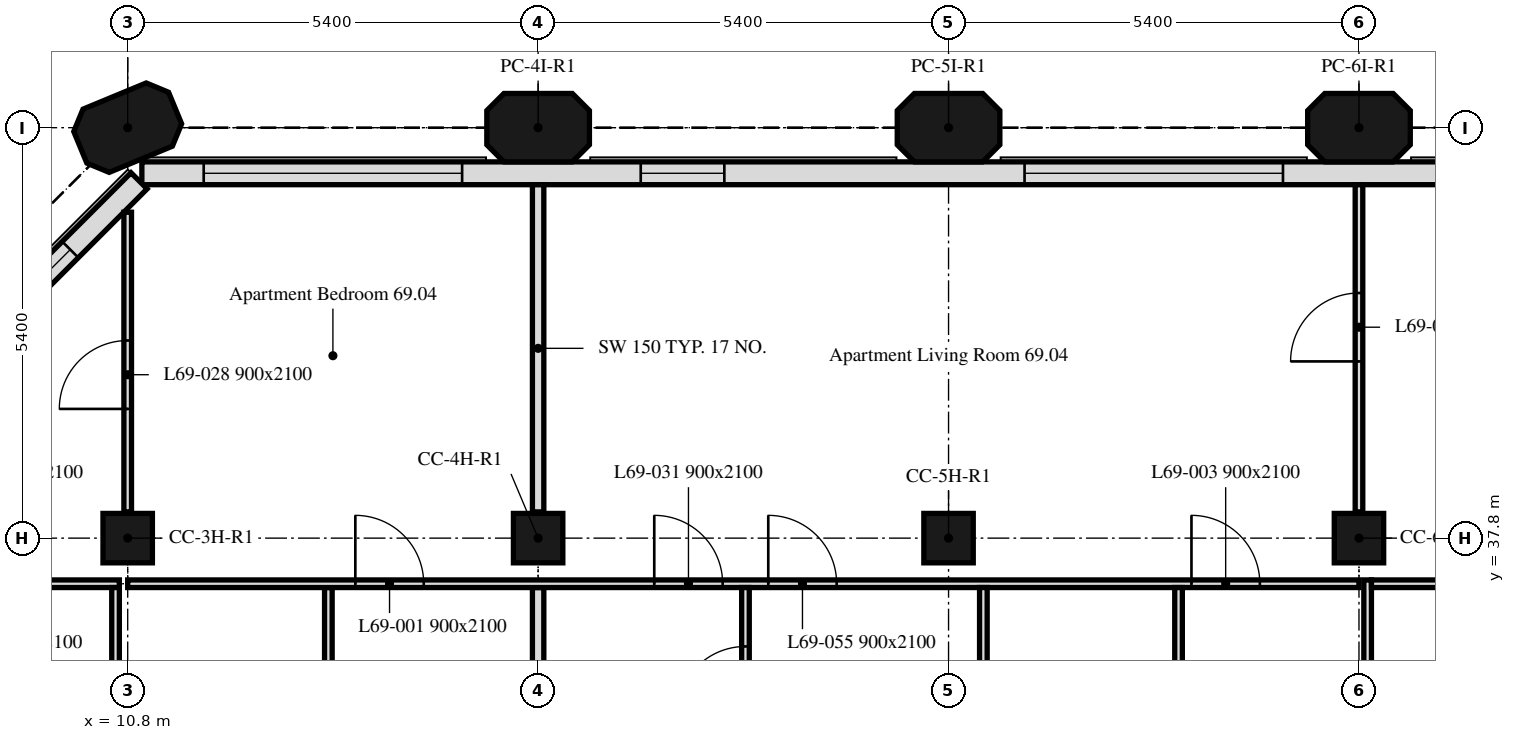
"""IFC4 building model, lengths in metres.
Left out: names, types, materials, properties, quantities, classifications, styles, units other than length and angle.
Written with IfcOpenShell. Run it as: python <this file> out.ifc"""

import sys

from ifc_helpers import new_model, si_unit, direction, frame, frame_2d, origin, origin_2d, place, context, subcontext, project, spatial, polyline, rectangle, outline, extrude, element, fill, save


model = new_model("IFC4")
c1 = context("Model", 3, precision=1e-05, world=origin(), true_north=direction((0.0, 1.0)))
c2 = subcontext(c1, "Body", "Model", "MODEL_VIEW")
j1 = project(units=[si_unit("LENGTHUNIT", "METRE"), si_unit("PLANEANGLEUNIT", "RADIAN")], contexts=[c1])
p1 = place(None, origin())
s1 = spatial("IfcSite", under=j1, at=p1, CompositionType="ELEMENT")
p2 = place(p1, origin())
s2 = spatial("IfcBuilding", under=s1, at=p2, CompositionType="ELEMENT")
p3 = place(p2, frame((0.0, 0.0, 281.8)))
s3 = spatial("IfcBuildingStorey", under=s2, at=p3, CompositionType="ELEMENT", Elevation=281.8)
for number, where, z_axis, x_axis in (
    (1, (10.8, 37.8, 0.0), (0.0, 0.0, 1.0), (1.0, 0.0, 0.0)),
    (2, (16.2, 37.8, 0.0), (0.0, 0.0, 1.0), (1.0, 0.0, 0.0)),
    (3, (21.6, 37.8, 0.0), (0.0, 0.0, 1.0), (1.0, 0.0, 0.0)),
    (4, (27.0, 37.8, 0.0), (0.0, 0.0, 1.0), (1.0, 0.0, 0.0)),
):
    element("IfcColumn", number, at=place(p3, frame(where, z_axis=z_axis, x_axis=x_axis)), inside=s3, PredefinedType="COLUMN", context=c2, shape_type="SweptSolid", body=[
        extrude(rectangle(XDim=0.65, YDim=0.65, at=origin_2d()), origin(), (0.0, 0.0, 1.0), 3.0),
    ])
for number, where, z_axis, x_axis in (
    (5, (10.8, 43.2, 0.0), (0.0, 0.0, 1.0), (0.924, 0.383, 0.0)),
    (6, (16.2, 43.2, 0.0), (0.0, 0.0, 1.0), (1.0, 0.0, 0.0)),
    (7, (21.6, 43.2, 0.0), (0.0, 0.0, 1.0), (1.0, 0.0, 0.0)),
    (8, (27.0, 43.2, 0.0), (0.0, 0.0, 1.0), (1.0, 0.0, 0.0)),
):
    element("IfcColumn", number, at=place(p3, frame(where, z_axis=z_axis, x_axis=x_axis)), inside=s3, PredefinedType="COLUMN", context=c2, shape_type="SweptSolid", body=[
        extrude(outline(polyline([(-0.45, -0.45), (0.45, -0.45), (0.675, -0.225), (0.675, 0.225), (0.45, 0.45), (-0.45, 0.45), (-0.675, 0.225), (-0.675, -0.225), (-0.45, -0.45)])), origin(), (0.0, 0.0, 1.0), 3.0),
    ])
p4 = place(p3, frame((43.014, 42.6, 0.0), z_axis=(0.0, 0.0, 1.0), x_axis=(-1.0, 0.0, 0.0)))
e9 = element("IfcWall", 9, at=p4, inside=s3, PredefinedType="SOLIDWALL", context=c2, shape_type="SweptSolid", body=[
    extrude(rectangle(XDim=32.027, YDim=0.3, at=frame_2d((16.014, 0.0))), origin(), (0.0, 0.0, 1.0), 3.0),
])
p5 = place(p4, frame((2.764, 0.0, 0.9)))
e10 = element("IfcOpeningElement", 10, at=p5, cuts=e9, PredefinedType="OPENING", context=c2, shape_type="SweptSolid", body=[
    extrude(rectangle(XDim=1.1, YDim=1.7, at=frame_2d((0.55, 0.85))), frame((0.0, 0.16, 0.0), z_axis=(0.0, -1.0, 0.0), x_axis=(1.0, 0.0, 0.0)), (0.0, 0.0, 1.0), 0.32),
])
p6 = place(p4, frame((6.214, 0.0, 0.9)))
e11 = element("IfcOpeningElement", 11, at=p6, cuts=e9, PredefinedType="OPENING", context=c2, shape_type="SweptSolid", body=[
    extrude(rectangle(XDim=3.4, YDim=1.7, at=frame_2d((1.7, 0.85))), frame((0.0, 0.16, 0.0), z_axis=(0.0, -1.0, 0.0), x_axis=(1.0, 0.0, 0.0)), (0.0, 0.0, 1.0), 0.32),
])
p7 = place(p4, frame((13.564, 0.0, 0.9)))
e12 = element("IfcOpeningElement", 12, at=p7, cuts=e9, PredefinedType="OPENING", context=c2, shape_type="SweptSolid", body=[
    extrude(rectangle(XDim=1.1, YDim=1.7, at=frame_2d((0.55, 0.85))), frame((0.0, 0.16, 0.0), z_axis=(0.0, -1.0, 0.0), x_axis=(1.0, 0.0, 0.0)), (0.0, 0.0, 1.0), 0.32),
])
p8 = place(p4, frame((17.014, 0.0, 0.9)))
e13 = element("IfcOpeningElement", 13, at=p8, cuts=e9, PredefinedType="OPENING", context=c2, shape_type="SweptSolid", body=[
    extrude(rectangle(XDim=3.4, YDim=1.7, at=frame_2d((1.7, 0.85))), frame((0.0, 0.16, 0.0), z_axis=(0.0, -1.0, 0.0), x_axis=(1.0, 0.0, 0.0)), (0.0, 0.0, 1.0), 0.32),
])
p9 = place(p4, frame((24.364, 0.0, 0.9)))
e14 = element("IfcOpeningElement", 14, at=p9, cuts=e9, PredefinedType="OPENING", context=c2, shape_type="SweptSolid", body=[
    extrude(rectangle(XDim=1.1, YDim=1.7, at=frame_2d((0.55, 0.85))), frame((0.0, 0.16, 0.0), z_axis=(0.0, -1.0, 0.0), x_axis=(1.0, 0.0, 0.0)), (0.0, 0.0, 1.0), 0.32),
])
p10 = place(p4, frame((27.814, 0.0, 0.9)))
e15 = element("IfcOpeningElement", 15, at=p10, cuts=e9, PredefinedType="OPENING", context=c2, shape_type="SweptSolid", body=[
    extrude(rectangle(XDim=3.4, YDim=1.7, at=frame_2d((1.7, 0.85))), frame((0.0, 0.16, 0.0), z_axis=(0.0, -1.0, 0.0), x_axis=(1.0, 0.0, 0.0)), (0.0, 0.0, 1.0), 0.32),
])
p11 = place(p3, frame((10.949, 42.501, 0.0), z_axis=(0.0, 0.0, 1.0), x_axis=(-0.707106781187, -0.707106781187, 0.0)))
e16 = element("IfcWall", 16, at=p11, inside=s3, PredefinedType="SOLIDWALL", context=c2, shape_type="SweptSolid", body=[
    extrude(rectangle(XDim=6.86, YDim=0.3, at=frame_2d((3.43, 0.0))), origin(), (0.0, 0.0, 1.0), 3.0),
])
p12 = place(p11, frame((1.28, 0.0, 0.9)))
e17 = element("IfcOpeningElement", 17, at=p12, cuts=e16, PredefinedType="OPENING", context=c2, shape_type="SweptSolid", body=[
    extrude(rectangle(XDim=1.1, YDim=1.7, at=frame_2d((0.55, 0.85))), frame((0.0, 0.16, 0.0), z_axis=(0.0, -1.0, 0.0), x_axis=(1.0, 0.0, 0.0)), (0.0, 0.0, 1.0), 0.32),
])
p13 = place(p11, frame((4.48, 0.0, 0.9)))
e18 = element("IfcOpeningElement", 18, at=p13, cuts=e16, PredefinedType="OPENING", context=c2, shape_type="SweptSolid", body=[
    extrude(rectangle(XDim=1.1, YDim=1.7, at=frame_2d((0.55, 0.85))), frame((0.0, 0.16, 0.0), z_axis=(0.0, -1.0, 0.0), x_axis=(1.0, 0.0, 0.0)), (0.0, 0.0, 1.0), 0.32),
])
p14 = place(p3, frame((6.151, 37.2, 0.0), z_axis=(0.0, 0.0, 1.0), x_axis=(1.0, 0.0, 0.0)))
e19 = element("IfcWall", 19, at=p14, inside=s3, PredefinedType="PARTITIONING", context=c2, shape_type="SweptSolid", body=[
    extrude(rectangle(XDim=4.539, YDim=0.1, at=frame_2d((2.27, 0.0))), origin(), (0.0, 0.0, 1.0), 3.0),
])
p15 = place(p14, frame((0.349, 0.0, 0.0)))
e20 = element("IfcOpeningElement", 20, at=p15, cuts=e19, PredefinedType="OPENING", context=c2, shape_type="SweptSolid", body=[
    extrude(rectangle(XDim=0.9, YDim=2.1, at=frame_2d((0.45, 1.05))), frame((0.0, 0.05, 0.0), z_axis=(0.0, -1.0, 0.0), x_axis=(1.0, 0.0, 0.0)), (0.0, 0.0, 1.0), 0.1),
])
p16 = place(p14, frame((1.849, 0.0, 0.0)))
e21 = element("IfcOpeningElement", 21, at=p16, cuts=e19, PredefinedType="OPENING", context=c2, shape_type="SweptSolid", body=[
    extrude(rectangle(XDim=0.9, YDim=2.1, at=frame_2d((0.45, 1.05))), frame((0.0, 0.05, 0.0), z_axis=(0.0, -1.0, 0.0), x_axis=(1.0, 0.0, 0.0)), (0.0, 0.0, 1.0), 0.1),
])
p17 = place(p3, frame((10.8, 38.145, 0.0), z_axis=(0.0, 0.0, 1.0), x_axis=(0.0, 1.0, 0.0)))
e22 = element("IfcWall", 22, at=p17, inside=s3, PredefinedType="PARTITIONING", context=c2, shape_type="SweptSolid", body=[
    extrude(rectangle(XDim=3.943, YDim=0.1, at=frame_2d((1.971, 0.0))), origin(), (0.0, 0.0, 1.0), 3.0),
])
p18 = place(p17, frame((1.355, 0.0, 0.0)))
e23 = element("IfcOpeningElement", 23, at=p18, cuts=e22, PredefinedType="OPENING", context=c2, shape_type="SweptSolid", body=[
    extrude(rectangle(XDim=0.9, YDim=2.1, at=frame_2d((0.45, 1.05))), frame((0.0, 0.05, 0.0), z_axis=(0.0, -1.0, 0.0), x_axis=(1.0, 0.0, 0.0)), (0.0, 0.0, 1.0), 0.1),
])
p19 = place(p3, frame((16.2, 38.145, 0.0), z_axis=(0.0, 0.0, 1.0), x_axis=(0.0, 1.0, 0.0)))
e24 = element("IfcWall", 24, at=p19, inside=s3, PredefinedType="PARTITIONING", context=c2, shape_type="SweptSolid", body=[
    extrude(rectangle(XDim=4.304, YDim=0.15, at=frame_2d((2.152, 0.0))), origin(), (0.0, 0.0, 1.0), 3.0),
])
p20 = place(p3, frame((10.64, 34.725, 0.0), z_axis=(0.0, 0.0, 1.0), x_axis=(0.0, 1.0, 0.0)))
e25 = element("IfcWall", 25, at=p20, inside=s3, PredefinedType="PARTITIONING", context=c2, shape_type="SweptSolid", body=[
    extrude(rectangle(XDim=2.425, YDim=0.1, at=frame_2d((1.212, 0.0))), origin(), (0.0, 0.0, 1.0), 3.0),
])
p21 = place(p20, frame((0.25, 0.0, 0.0)))
e26 = element("IfcOpeningElement", 26, at=p21, cuts=e25, PredefinedType="OPENING", context=c2, shape_type="SweptSolid", body=[
    extrude(rectangle(XDim=0.9, YDim=2.1, at=frame_2d((0.45, 1.05))), frame((0.0, 0.05, 0.0), z_axis=(0.0, -1.0, 0.0), x_axis=(1.0, 0.0, 0.0)), (0.0, 0.0, 1.0), 0.1),
])
p22 = place(p3, frame((13.44, 34.725, 0.0), z_axis=(0.0, 0.0, 1.0), x_axis=(0.0, 1.0, 0.0)))
e27 = element("IfcWall", 27, at=p22, inside=s3, PredefinedType="PARTITIONING", context=c2, shape_type="SweptSolid", body=[
    extrude(rectangle(XDim=2.425, YDim=0.1, at=frame_2d((1.212, 0.0))), origin(), (0.0, 0.0, 1.0), 3.0),
])
p23 = place(p3, frame((16.2, 34.725, 0.0), z_axis=(0.0, 0.0, 1.0), x_axis=(0.0, 1.0, 0.0)))
e28 = element("IfcWall", 28, at=p23, inside=s3, PredefinedType="PARTITIONING", context=c2, shape_type="SweptSolid", body=[
    extrude(rectangle(XDim=2.425, YDim=0.15, at=frame_2d((1.212, 0.0))), origin(), (0.0, 0.0, 1.0), 3.0),
])
p24 = place(p3, frame((10.8, 37.2, 0.0), z_axis=(0.0, 0.0, 1.0), x_axis=(1.0, 0.0, 0.0)))
e29 = element("IfcWall", 29, at=p24, inside=s3, PredefinedType="PARTITIONING", context=c2, shape_type="SweptSolid", body=[
    extrude(rectangle(XDim=16.2, YDim=0.1, at=frame_2d((8.1, 0.0))), origin(), (0.0, 0.0, 1.0), 3.0),
])
p25 = place(p24, frame((2.995, 0.0, 0.0)))
e30 = element("IfcOpeningElement", 30, at=p25, cuts=e29, PredefinedType="OPENING", context=c2, shape_type="SweptSolid", body=[
    extrude(rectangle(XDim=0.9, YDim=2.1, at=frame_2d((0.45, 1.05))), frame((0.0, 0.05, 0.0), z_axis=(0.0, -1.0, 0.0), x_axis=(1.0, 0.0, 0.0)), (0.0, 0.0, 1.0), 0.1),
])
p26 = place(p24, frame((13.996, 0.0, 0.0)))
e31 = element("IfcOpeningElement", 31, at=p26, cuts=e29, PredefinedType="OPENING", context=c2, shape_type="SweptSolid", body=[
    extrude(rectangle(XDim=0.9, YDim=2.1, at=frame_2d((0.45, 1.05))), frame((0.0, 0.05, 0.0), z_axis=(0.0, -1.0, 0.0), x_axis=(1.0, 0.0, 0.0)), (0.0, 0.0, 1.0), 0.1),
])
p27 = place(p24, frame((6.928, 0.0, 0.0)))
e32 = element("IfcOpeningElement", 32, at=p27, cuts=e29, PredefinedType="OPENING", context=c2, shape_type="SweptSolid", body=[
    extrude(rectangle(XDim=0.9, YDim=2.1, at=frame_2d((0.45, 1.05))), frame((0.0, 0.05, 0.0), z_axis=(0.0, -1.0, 0.0), x_axis=(1.0, 0.0, 0.0)), (0.0, 0.0, 1.0), 0.1),
])
p28 = place(p24, frame((8.428, 0.0, 0.0)))
e33 = element("IfcOpeningElement", 33, at=p28, cuts=e29, PredefinedType="OPENING", context=c2, shape_type="SweptSolid", body=[
    extrude(rectangle(XDim=0.9, YDim=2.1, at=frame_2d((0.45, 1.05))), frame((0.0, 0.05, 0.0), z_axis=(0.0, -1.0, 0.0), x_axis=(1.0, 0.0, 0.0)), (0.0, 0.0, 1.0), 0.1),
])
p29 = place(p3, frame((27.0, 38.145, 0.0), z_axis=(0.0, 0.0, 1.0), x_axis=(0.0, 1.0, 0.0)))
e34 = element("IfcWall", 34, at=p29, inside=s3, PredefinedType="PARTITIONING", context=c2, shape_type="SweptSolid", body=[
    extrude(rectangle(XDim=4.304, YDim=0.1, at=frame_2d((2.152, 0.0))), origin(), (0.0, 0.0, 1.0), 3.0),
])
p30 = place(p29, frame((1.98, 0.0, 0.0)))
e35 = element("IfcOpeningElement", 35, at=p30, cuts=e34, PredefinedType="OPENING", context=c2, shape_type="SweptSolid", body=[
    extrude(rectangle(XDim=0.9, YDim=2.1, at=frame_2d((0.45, 1.05))), frame((0.0, 0.05, 0.0), z_axis=(0.0, -1.0, 0.0), x_axis=(1.0, 0.0, 0.0)), (0.0, 0.0, 1.0), 0.1),
])
p31 = place(p3, frame((18.928, 34.725, 0.0), z_axis=(0.0, 0.0, 1.0), x_axis=(0.0, 1.0, 0.0)))
e36 = element("IfcWall", 36, at=p31, inside=s3, PredefinedType="PARTITIONING", context=c2, shape_type="SweptSolid", body=[
    extrude(rectangle(XDim=2.425, YDim=0.1, at=frame_2d((1.212, 0.0))), origin(), (0.0, 0.0, 1.0), 3.0),
])
p32 = place(p31, frame((0.75, 0.0, 0.0)))
e37 = element("IfcOpeningElement", 37, at=p32, cuts=e36, PredefinedType="OPENING", context=c2, shape_type="SweptSolid", body=[
    extrude(rectangle(XDim=0.9, YDim=2.1, at=frame_2d((0.45, 1.05))), frame((0.0, 0.05, 0.0), z_axis=(0.0, -1.0, 0.0), x_axis=(1.0, 0.0, 0.0)), (0.0, 0.0, 1.0), 0.1),
])
p33 = place(p3, frame((22.058, 34.725, 0.0), z_axis=(0.0, 0.0, 1.0), x_axis=(0.0, 1.0, 0.0)))
e38 = element("IfcWall", 38, at=p33, inside=s3, PredefinedType="PARTITIONING", context=c2, shape_type="SweptSolid", body=[
    extrude(rectangle(XDim=2.425, YDim=0.1, at=frame_2d((1.212, 0.0))), origin(), (0.0, 0.0, 1.0), 3.0),
])
p34 = place(p33, frame((0.25, 0.0, 0.0)))
e39 = element("IfcOpeningElement", 39, at=p34, cuts=e38, PredefinedType="OPENING", context=c2, shape_type="SweptSolid", body=[
    extrude(rectangle(XDim=0.9, YDim=2.1, at=frame_2d((0.45, 1.05))), frame((0.0, 0.05, 0.0), z_axis=(0.0, -1.0, 0.0), x_axis=(1.0, 0.0, 0.0)), (0.0, 0.0, 1.0), 0.1),
])
p35 = place(p3, frame((24.626, 34.725, 0.0), z_axis=(0.0, 0.0, 1.0), x_axis=(0.0, 1.0, 0.0)))
e40 = element("IfcWall", 40, at=p35, inside=s3, PredefinedType="PARTITIONING", context=c2, shape_type="SweptSolid", body=[
    extrude(rectangle(XDim=2.425, YDim=0.1, at=frame_2d((1.212, 0.0))), origin(), (0.0, 0.0, 1.0), 3.0),
])
p36 = place(p3, frame((27.114, 34.725, 0.0), z_axis=(0.0, 0.0, 1.0), x_axis=(0.0, 1.0, 0.0)))
e41 = element("IfcWall", 41, at=p36, inside=s3, PredefinedType="PARTITIONING", context=c2, shape_type="SweptSolid", body=[
    extrude(rectangle(XDim=2.525, YDim=0.1, at=frame_2d((1.262, 0.0))), origin(), (0.0, 0.0, 1.0), 3.0),
])
p37 = place(p3, frame((27.164, 37.2, 0.0), z_axis=(0.0, 0.0, 1.0), x_axis=(1.0, 0.0, 0.0)))
e42 = element("IfcWall", 42, at=p37, inside=s3, PredefinedType="PARTITIONING", context=c2, shape_type="SweptSolid", body=[
    extrude(rectangle(XDim=10.636, YDim=0.1, at=frame_2d((5.318, 0.0))), origin(), (0.0, 0.0, 1.0), 3.0),
])
p38 = place(p37, frame((1.807, 0.0, 0.0)))
e43 = element("IfcOpeningElement", 43, at=p38, cuts=e42, PredefinedType="OPENING", context=c2, shape_type="SweptSolid", body=[
    extrude(rectangle(XDim=0.9, YDim=2.1, at=frame_2d((0.45, 1.05))), frame((0.0, 0.05, 0.0), z_axis=(0.0, -1.0, 0.0), x_axis=(1.0, 0.0, 0.0)), (0.0, 0.0, 1.0), 0.1),
])
p39 = place(p37, frame((3.941, 0.0, 0.0)))
e44 = element("IfcOpeningElement", 44, at=p39, cuts=e42, PredefinedType="OPENING", context=c2, shape_type="SweptSolid", body=[
    extrude(rectangle(XDim=0.9, YDim=2.1, at=frame_2d((0.45, 1.05))), frame((0.0, 0.05, 0.0), z_axis=(0.0, -1.0, 0.0), x_axis=(1.0, 0.0, 0.0)), (0.0, 0.0, 1.0), 0.1),
])
p40 = place(p37, frame((6.586, 0.0, 0.0)))
e45 = element("IfcOpeningElement", 45, at=p40, cuts=e42, PredefinedType="OPENING", context=c2, shape_type="SweptSolid", body=[
    extrude(rectangle(XDim=0.9, YDim=2.1, at=frame_2d((0.45, 1.05))), frame((0.0, 0.05, 0.0), z_axis=(0.0, -1.0, 0.0), x_axis=(1.0, 0.0, 0.0)), (0.0, 0.0, 1.0), 0.1),
])
p41 = place(p8, origin())
e46 = element("IfcWindow", 46, at=p41, inside=s3, PartitioningType="SINGLE_PANEL", PredefinedType="WINDOW", context=c2, shape_type="SweptSolid", body=[
    extrude(rectangle(XDim=3.4, YDim=1.7, at=frame_2d((1.7, 0.85))), frame((0.0, 0.03, 0.0), z_axis=(0.0, -1.0, 0.0), x_axis=(1.0, 0.0, 0.0)), (0.0, 0.0, 1.0), 0.06),
])
fill(e13, e46)
p42 = place(p9, origin())
e47 = element("IfcWindow", 47, at=p42, inside=s3, PartitioningType="SINGLE_PANEL", PredefinedType="WINDOW", context=c2, shape_type="SweptSolid", body=[
    extrude(rectangle(XDim=1.1, YDim=1.7, at=frame_2d((0.55, 0.85))), frame((0.0, 0.03, 0.0), z_axis=(0.0, -1.0, 0.0), x_axis=(1.0, 0.0, 0.0)), (0.0, 0.0, 1.0), 0.06),
])
fill(e14, e47)
p43 = place(p10, origin())
e48 = element("IfcWindow", 48, at=p43, inside=s3, PartitioningType="SINGLE_PANEL", PredefinedType="WINDOW", context=c2, shape_type="SweptSolid", body=[
    extrude(rectangle(XDim=3.4, YDim=1.7, at=frame_2d((1.7, 0.85))), frame((0.0, 0.03, 0.0), z_axis=(0.0, -1.0, 0.0), x_axis=(1.0, 0.0, 0.0)), (0.0, 0.0, 1.0), 0.06),
])
fill(e15, e48)
p44 = place(p12, origin())
e49 = element("IfcWindow", 49, at=p44, inside=s3, PartitioningType="SINGLE_PANEL", PredefinedType="WINDOW", context=c2, shape_type="SweptSolid", body=[
    extrude(rectangle(XDim=1.1, YDim=1.7, at=frame_2d((0.55, 0.85))), frame((0.0, 0.03, 0.0), z_axis=(0.0, -1.0, 0.0), x_axis=(1.0, 0.0, 0.0)), (0.0, 0.0, 1.0), 0.06),
])
fill(e17, e49)
p45 = place(p25, origin())
e50 = element("IfcDoor", 50, at=p45, inside=s3, OperationType="SINGLE_SWING_RIGHT", PredefinedType="DOOR", context=c2, shape_type="SweptSolid", body=[
    extrude(rectangle(XDim=0.9, YDim=2.1, at=frame_2d((0.45, 1.05))), frame((0.0, 0.025, 0.0), z_axis=(0.0, -1.0, 0.0), x_axis=(1.0, 0.0, 0.0)), (0.0, 0.0, 1.0), 0.05),
])
fill(e30, e50)
p46 = place(p26, origin())
e51 = element("IfcDoor", 51, at=p46, inside=s3, OperationType="SINGLE_SWING_RIGHT", PredefinedType="DOOR", context=c2, shape_type="SweptSolid", body=[
    extrude(rectangle(XDim=0.9, YDim=2.1, at=frame_2d((0.45, 1.05))), frame((0.0, 0.025, 0.0), z_axis=(0.0, -1.0, 0.0), x_axis=(1.0, 0.0, 0.0)), (0.0, 0.0, 1.0), 0.05),
])
fill(e31, e51)
p47 = place(p18, origin())
e52 = element("IfcDoor", 52, at=p47, inside=s3, OperationType="SINGLE_SWING_LEFT", PredefinedType="DOOR", context=c2, shape_type="SweptSolid", body=[
    extrude(rectangle(XDim=0.9, YDim=2.1, at=frame_2d((0.45, 1.05))), frame((0.0, 0.025, 0.0), z_axis=(0.0, -1.0, 0.0), x_axis=(1.0, 0.0, 0.0)), (0.0, 0.0, 1.0), 0.05),
])
fill(e23, e52)
p48 = place(p27, origin())
e53 = element("IfcDoor", 53, at=p48, inside=s3, OperationType="SINGLE_SWING_LEFT", PredefinedType="DOOR", context=c2, shape_type="SweptSolid", body=[
    extrude(rectangle(XDim=0.9, YDim=2.1, at=frame_2d((0.45, 1.05))), frame((0.0, 0.025, 0.0), z_axis=(0.0, -1.0, 0.0), x_axis=(1.0, 0.0, 0.0)), (0.0, 0.0, 1.0), 0.05),
])
fill(e32, e53)
p49 = place(p32, origin())
e54 = element("IfcDoor", 54, at=p49, inside=s3, OperationType="SINGLE_SWING_RIGHT", PredefinedType="DOOR", context=c2, shape_type="SweptSolid", body=[
    extrude(rectangle(XDim=0.9, YDim=2.1, at=frame_2d((0.45, 1.05))), frame((0.0, 0.025, 0.0), z_axis=(0.0, -1.0, 0.0), x_axis=(1.0, 0.0, 0.0)), (0.0, 0.0, 1.0), 0.05),
])
fill(e37, e54)
p50 = place(p30, origin())
e55 = element("IfcDoor", 55, at=p50, inside=s3, OperationType="SINGLE_SWING_LEFT", PredefinedType="DOOR", context=c2, shape_type="SweptSolid", body=[
    extrude(rectangle(XDim=0.9, YDim=2.1, at=frame_2d((0.45, 1.05))), frame((0.0, 0.025, 0.0), z_axis=(0.0, -1.0, 0.0), x_axis=(1.0, 0.0, 0.0)), (0.0, 0.0, 1.0), 0.05),
])
fill(e35, e55)
p51 = place(p28, origin())
e56 = element("IfcDoor", 56, at=p51, inside=s3, OperationType="SINGLE_SWING_RIGHT", PredefinedType="DOOR", context=c2, shape_type="SweptSolid", body=[
    extrude(rectangle(XDim=0.9, YDim=2.1, at=frame_2d((0.45, 1.05))), frame((0.0, 0.025, 0.0), z_axis=(0.0, -1.0, 0.0), x_axis=(1.0, 0.0, 0.0)), (0.0, 0.0, 1.0), 0.05),
])
fill(e33, e56)
save(model, sys.argv[1])
